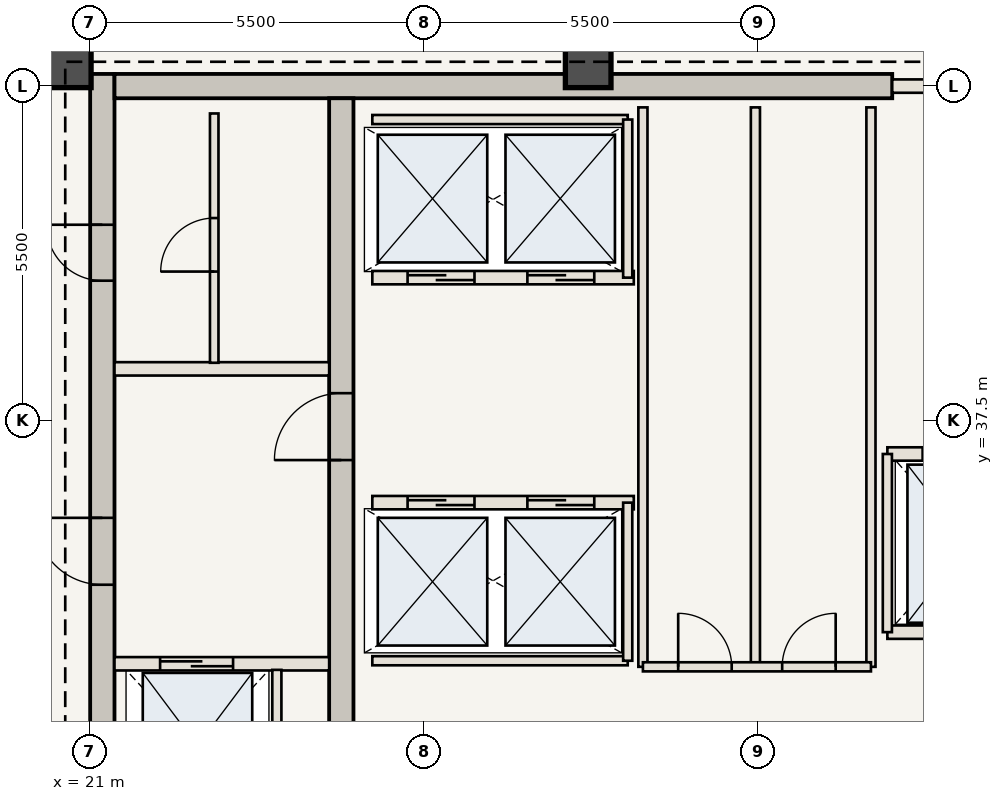
"""IFC4 building model, lengths in metres.
Left out: names, types, materials, properties, quantities, classifications, styles, units other than length and angle.
Written with IfcOpenShell. Run it as: python <this file> out.ifc"""

import sys

from ifc_helpers import new_model, si_unit, direction, frame, frame_2d, origin, origin_2d, place, context, subcontext, project, spatial, rectangle, extrude, element, fill, save


model = new_model("IFC4")
c1 = context("Model", 3, precision=1e-05, world=origin(), true_north=direction((0.0, 1.0)))
c2 = subcontext(c1, "Body", "Model", "MODEL_VIEW")
j1 = project(units=[si_unit("LENGTHUNIT", "METRE"), si_unit("PLANEANGLEUNIT", "RADIAN")], contexts=[c1])
p1 = place(None, origin())
s1 = spatial("IfcSite", under=j1, at=p1, CompositionType="ELEMENT")
p2 = place(p1, origin())
s2 = spatial("IfcBuilding", under=s1, at=p2, CompositionType="ELEMENT")
p3 = place(p2, frame((0.0, 0.0, 281.4)))
s3 = spatial("IfcBuildingStorey", under=s2, at=p3, CompositionType="ELEMENT", Elevation=281.4)
p4 = place(p3, frame((21.21, 30.6, 0.0), z_axis=(0.0, 0.0, 1.0), x_axis=(0.0, 1.0, 0.0)))
e1 = element("IfcWall", 1, at=p4, inside=s3, PredefinedType="SHEAR", context=c2, shape_type="SweptSolid", body=[
    extrude(rectangle(XDim=12.6, YDim=0.4, at=frame_2d((6.3, 0.0))), origin(), (0.0, 0.0, 1.0), 3.85),
])
p5 = place(p4, frame((4.2, 0.0, 0.0)))
e2 = element("IfcOpeningElement", 2, at=p5, cuts=e1, PredefinedType="OPENING", context=c2, shape_type="SweptSolid", body=[
    extrude(rectangle(XDim=1.1, YDim=2.15, at=frame_2d((0.55, 1.075))), frame((0.0, 0.21, 0.0), z_axis=(0.0, -1.0, 0.0), x_axis=(1.0, 0.0, 0.0)), (0.0, 0.0, 1.0), 0.42),
])
p6 = place(p4, frame((9.2, 0.0, 0.0)))
e3 = element("IfcOpeningElement", 3, at=p6, cuts=e1, PredefinedType="OPENING", context=c2, shape_type="SweptSolid", body=[
    extrude(rectangle(XDim=0.92, YDim=2.1, at=frame_2d((0.46, 1.05))), frame((0.0, 0.21, 0.0), z_axis=(0.0, -1.0, 0.0), x_axis=(1.0, 0.0, 0.0)), (0.0, 0.0, 1.0), 0.42),
])
p7 = place(p3, frame((21.41, 43.0, 0.0), z_axis=(0.0, 0.0, 1.0), x_axis=(1.0, 0.0, 0.0)))
e4 = element("IfcWall", 4, at=p7, inside=s3, PredefinedType="SHEAR", context=c2, shape_type="SweptSolid", body=[
    extrude(rectangle(XDim=12.79, YDim=0.4, at=frame_2d((6.395, 0.0))), origin(), (0.0, 0.0, 1.0), 3.85),
])
p8 = place(p3, frame((25.14, 30.6, 0.0), z_axis=(0.0, 0.0, 1.0), x_axis=(0.0, 1.0, 0.0)))
e5 = element("IfcWall", 5, at=p8, inside=s3, PredefinedType="SHEAR", context=c2, shape_type="SweptSolid", body=[
    extrude(rectangle(XDim=12.2, YDim=0.4, at=frame_2d((6.1, 0.0))), origin(), (0.0, 0.0, 1.0), 3.85),
])
p9 = place(p8, frame((6.25, 0.0, 0.0)))
e6 = element("IfcOpeningElement", 6, at=p9, cuts=e5, PredefinedType="OPENING", context=c2, shape_type="SweptSolid", body=[
    extrude(rectangle(XDim=1.1, YDim=2.15, at=frame_2d((0.55, 1.075))), frame((0.0, 0.21, 0.0), z_axis=(0.0, -1.0, 0.0), x_axis=(1.0, 0.0, 0.0)), (0.0, 0.0, 1.0), 0.42),
])
for number, where, z_axis, x_axis in (
    (7, (29.2, 43.35, 0.0), (0.0, 0.0, 1.0), (1.0, 0.0, 0.0)),
    (8, (20.65, 43.35, 0.0), (0.0, 0.0, 1.0), (1.0, 0.0, 0.0)),
):
    element("IfcColumn", number, at=place(p3, frame(where, z_axis=z_axis, x_axis=x_axis)), inside=s3, PredefinedType="COLUMN", context=c2, shape_type="SweptSolid", body=[
        extrude(rectangle(XDim=0.75, YDim=0.75, at=origin_2d()), origin(), (0.0, 0.0, 1.0), 3.85),
    ])
p10 = place(p3, frame((21.41, 33.5, 0.0), z_axis=(0.0, 0.0, 1.0), x_axis=(1.0, 0.0, 0.0)))
e9 = element("IfcWall", 9, at=p10, inside=s3, PredefinedType="STANDARD", context=c2, shape_type="SweptSolid", body=[
    extrude(rectangle(XDim=3.53, YDim=0.22, at=frame_2d((1.765, 0.0))), origin(), (0.0, 0.0, 1.0), 3.685),
])
p11 = place(p10, frame((0.75, 0.0, 0.0)))
e10 = element("IfcOpeningElement", 10, at=p11, cuts=e9, PredefinedType="OPENING", context=c2, shape_type="SweptSolid", body=[
    extrude(rectangle(XDim=1.2, YDim=2.2, at=frame_2d((0.6, 1.1))), frame((0.0, 0.12, 0.0), z_axis=(0.0, -1.0, 0.0), x_axis=(1.0, 0.0, 0.0)), (0.0, 0.0, 1.0), 0.24),
])
p12 = place(p3, frame((24.08, 30.75, 0.0), z_axis=(0.0, 0.0, 1.0), x_axis=(0.0, 1.0, 0.0)))
e11 = element("IfcWall", 11, at=p12, inside=s3, PredefinedType="STANDARD", context=c2, shape_type="SweptSolid", body=[
    extrude(rectangle(XDim=2.65, YDim=0.15, at=frame_2d((1.325, 0.0))), origin(), (0.0, 0.0, 1.0), 3.685),
])
p13 = place(p3, frame((21.41, 38.35, 0.0), z_axis=(0.0, 0.0, 1.0), x_axis=(1.0, 0.0, 0.0)))
e12 = element("IfcWall", 12, at=p13, inside=s3, PredefinedType="STANDARD", context=c2, shape_type="SweptSolid", body=[
    extrude(rectangle(XDim=3.53, YDim=0.22, at=frame_2d((1.765, 0.0))), origin(), (0.0, 0.0, 1.0), 3.685),
])
p14 = place(p3, frame((23.05, 38.45, 0.0), z_axis=(0.0, 0.0, 1.0), x_axis=(0.0, 1.0, 0.0)))
e13 = element("IfcWall", 13, at=p14, inside=s3, PredefinedType="STANDARD", context=c2, shape_type="SweptSolid", body=[
    extrude(rectangle(XDim=4.1, YDim=0.14, at=frame_2d((2.05, 0.0))), origin(), (0.0, 0.0, 1.0), 3.685),
])
p15 = place(p14, frame((1.5, 0.0, 0.0)))
e14 = element("IfcOpeningElement", 14, at=p15, cuts=e13, PredefinedType="OPENING", context=c2, shape_type="SweptSolid", body=[
    extrude(rectangle(XDim=0.88, YDim=2.1, at=frame_2d((0.44, 1.05))), frame((0.0, 0.08, 0.0), z_axis=(0.0, -1.0, 0.0), x_axis=(1.0, 0.0, 0.0)), (0.0, 0.0, 1.0), 0.16),
])
p16 = place(p3, frame((25.65, 36.15, 0.0), z_axis=(0.0, 0.0, 1.0), x_axis=(1.0, 0.0, 0.0)))
e15 = element("IfcWall", 15, at=p16, inside=s3, PredefinedType="STANDARD", context=c2, shape_type="SweptSolid", body=[
    extrude(rectangle(XDim=4.3, YDim=0.22, at=frame_2d((2.15, 0.0))), origin(), (0.0, 0.0, 1.0), 3.685),
])
p17 = place(p16, frame((0.58, 0.0, 0.0)))
e16 = element("IfcOpeningElement", 16, at=p17, cuts=e15, PredefinedType="OPENING", context=c2, shape_type="SweptSolid", body=[
    extrude(rectangle(XDim=1.1, YDim=2.15, at=frame_2d((0.55, 1.075))), frame((0.0, 0.12, 0.0), z_axis=(0.0, -1.0, 0.0), x_axis=(1.0, 0.0, 0.0)), (0.0, 0.0, 1.0), 0.24),
])
p18 = place(p16, frame((2.55, 0.0, 0.0)))
e17 = element("IfcOpeningElement", 17, at=p18, cuts=e15, PredefinedType="OPENING", context=c2, shape_type="SweptSolid", body=[
    extrude(rectangle(XDim=1.1, YDim=2.15, at=frame_2d((0.55, 1.075))), frame((0.0, 0.12, 0.0), z_axis=(0.0, -1.0, 0.0), x_axis=(1.0, 0.0, 0.0)), (0.0, 0.0, 1.0), 0.24),
])
p19 = place(p3, frame((25.65, 33.55, 0.0), z_axis=(0.0, 0.0, 1.0), x_axis=(1.0, 0.0, 0.0)))
e18 = element("IfcWall", 18, at=p19, inside=s3, PredefinedType="STANDARD", context=c2, shape_type="SweptSolid", body=[
    extrude(rectangle(XDim=4.2, YDim=0.15, at=frame_2d((2.1, 0.0))), origin(), (0.0, 0.0, 1.0), 3.685),
])
p20 = place(p3, frame((29.85, 33.55, 0.0), z_axis=(0.0, 0.0, 1.0), x_axis=(0.0, 1.0, 0.0)))
e19 = element("IfcWall", 19, at=p20, inside=s3, PredefinedType="STANDARD", context=c2, shape_type="SweptSolid", body=[
    extrude(rectangle(XDim=2.6, YDim=0.15, at=frame_2d((1.3, 0.0))), origin(), (0.0, 0.0, 1.0), 3.685),
])
p21 = place(p3, frame((25.65, 39.85, 0.0), z_axis=(0.0, 0.0, 1.0), x_axis=(1.0, 0.0, 0.0)))
e20 = element("IfcWall", 20, at=p21, inside=s3, PredefinedType="STANDARD", context=c2, shape_type="SweptSolid", body=[
    extrude(rectangle(XDim=4.3, YDim=0.22, at=frame_2d((2.15, 0.0))), origin(), (0.0, 0.0, 1.0), 3.685),
])
p22 = place(p21, frame((0.58, 0.0, 0.0)))
e21 = element("IfcOpeningElement", 21, at=p22, cuts=e20, PredefinedType="OPENING", context=c2, shape_type="SweptSolid", body=[
    extrude(rectangle(XDim=1.1, YDim=2.15, at=frame_2d((0.55, 1.075))), frame((0.0, 0.12, 0.0), z_axis=(0.0, -1.0, 0.0), x_axis=(1.0, 0.0, 0.0)), (0.0, 0.0, 1.0), 0.24),
])
p23 = place(p21, frame((2.55, 0.0, 0.0)))
e22 = element("IfcOpeningElement", 22, at=p23, cuts=e20, PredefinedType="OPENING", context=c2, shape_type="SweptSolid", body=[
    extrude(rectangle(XDim=1.1, YDim=2.15, at=frame_2d((0.55, 1.075))), frame((0.0, 0.12, 0.0), z_axis=(0.0, -1.0, 0.0), x_axis=(1.0, 0.0, 0.0)), (0.0, 0.0, 1.0), 0.24),
])
p24 = place(p3, frame((25.65, 42.45, 0.0), z_axis=(0.0, 0.0, 1.0), x_axis=(1.0, 0.0, 0.0)))
e23 = element("IfcWall", 23, at=p24, inside=s3, PredefinedType="STANDARD", context=c2, shape_type="SweptSolid", body=[
    extrude(rectangle(XDim=4.2, YDim=0.15, at=frame_2d((2.1, 0.0))), origin(), (0.0, 0.0, 1.0), 3.685),
])
p25 = place(p3, frame((29.85, 39.85, 0.0), z_axis=(0.0, 0.0, 1.0), x_axis=(0.0, 1.0, 0.0)))
e24 = element("IfcWall", 24, at=p25, inside=s3, PredefinedType="STANDARD", context=c2, shape_type="SweptSolid", body=[
    extrude(rectangle(XDim=2.6, YDim=0.15, at=frame_2d((1.3, 0.0))), origin(), (0.0, 0.0, 1.0), 3.685),
])
for number, where, z_axis, x_axis in (
    (25, (30.1, 33.45, 0.0), (0.0, 0.0, 1.0), (0.0, 1.0, 0.0)),
    (26, (31.95, 33.45, 0.0), (0.0, 0.0, 1.0), (0.0, 1.0, 0.0)),
    (27, (33.85, 33.45, 0.0), (0.0, 0.0, 1.0), (0.0, 1.0, 0.0)),
):
    element("IfcWall", number, at=place(p3, frame(where, z_axis=z_axis, x_axis=x_axis)), inside=s3, PredefinedType="STANDARD", context=c2, shape_type="SweptSolid", body=[
        extrude(rectangle(XDim=9.2, YDim=0.15, at=frame_2d((4.6, 0.0))), origin(), (0.0, 0.0, 1.0), 3.685),
    ])
p26 = place(p3, frame((30.1, 33.45, 0.0), z_axis=(0.0, 0.0, 1.0), x_axis=(1.0, 0.0, 0.0)))
e28 = element("IfcWall", 28, at=p26, inside=s3, PredefinedType="STANDARD", context=c2, shape_type="SweptSolid", body=[
    extrude(rectangle(XDim=3.75, YDim=0.15, at=frame_2d((1.875, 0.0))), origin(), (0.0, 0.0, 1.0), 3.685),
])
p27 = place(p26, frame((0.58, 0.0, 0.0)))
e29 = element("IfcOpeningElement", 29, at=p27, cuts=e28, PredefinedType="OPENING", context=c2, shape_type="SweptSolid", body=[
    extrude(rectangle(XDim=0.88, YDim=2.1, at=frame_2d((0.44, 1.05))), frame((0.0, 0.085, 0.0), z_axis=(0.0, -1.0, 0.0), x_axis=(1.0, 0.0, 0.0)), (0.0, 0.0, 1.0), 0.17),
])
p28 = place(p26, frame((2.29, 0.0, 0.0)))
e30 = element("IfcOpeningElement", 30, at=p28, cuts=e28, PredefinedType="OPENING", context=c2, shape_type="SweptSolid", body=[
    extrude(rectangle(XDim=0.88, YDim=2.1, at=frame_2d((0.44, 1.05))), frame((0.0, 0.085, 0.0), z_axis=(0.0, -1.0, 0.0), x_axis=(1.0, 0.0, 0.0)), (0.0, 0.0, 1.0), 0.17),
])
p29 = place(p3, frame((34.2, 43.0, 0.0), z_axis=(0.0, 0.0, 1.0), x_axis=(1.0, 0.0, 0.0)))
e31 = element("IfcWall", 31, at=p29, inside=s3, PredefinedType="STANDARD", context=c2, shape_type="SweptSolid", body=[
    extrude(rectangle(XDim=3.55, YDim=0.22, at=frame_2d((1.775, 0.0))), origin(), (0.0, 0.0, 1.0), 3.685),
])
p30 = place(p29, frame((1.4, 0.0, 0.0)))
e32 = element("IfcOpeningElement", 32, at=p30, cuts=e31, PredefinedType="OPENING", context=c2, shape_type="SweptSolid", body=[
    extrude(rectangle(XDim=1.1, YDim=2.15, at=frame_2d((0.55, 1.075))), frame((0.0, 0.12, 0.0), z_axis=(0.0, -1.0, 0.0), x_axis=(1.0, 0.0, 0.0)), (0.0, 0.0, 1.0), 0.24),
])
p31 = place(p3, frame((34.12, 36.95, 0.0), z_axis=(0.0, 0.0, 1.0), x_axis=(1.0, 0.0, 0.0)))
e33 = element("IfcWall", 33, at=p31, inside=s3, PredefinedType="STANDARD", context=c2, shape_type="SweptSolid", body=[
    extrude(rectangle(XDim=2.68, YDim=0.22, at=frame_2d((1.34, 0.0))), origin(), (0.0, 0.0, 1.0), 3.685),
])
p32 = place(p31, frame((0.58, 0.0, 0.0)))
e34 = element("IfcOpeningElement", 34, at=p32, cuts=e33, PredefinedType="OPENING", context=c2, shape_type="SweptSolid", body=[
    extrude(rectangle(XDim=1.2, YDim=2.2, at=frame_2d((0.6, 1.1))), frame((0.0, 0.12, 0.0), z_axis=(0.0, -1.0, 0.0), x_axis=(1.0, 0.0, 0.0)), (0.0, 0.0, 1.0), 0.24),
])
p33 = place(p3, frame((34.12, 34.02, 0.0), z_axis=(0.0, 0.0, 1.0), x_axis=(1.0, 0.0, 0.0)))
e35 = element("IfcWall", 35, at=p33, inside=s3, PredefinedType="STANDARD", context=c2, shape_type="SweptSolid", body=[
    extrude(rectangle(XDim=2.68, YDim=0.22, at=frame_2d((1.34, 0.0))), origin(), (0.0, 0.0, 1.0), 3.685),
])
p34 = place(p3, frame((34.12, 34.02, 0.0), z_axis=(0.0, 0.0, 1.0), x_axis=(0.0, 1.0, 0.0)))
e36 = element("IfcWall", 36, at=p34, inside=s3, PredefinedType="STANDARD", context=c2, shape_type="SweptSolid", body=[
    extrude(rectangle(XDim=2.93, YDim=0.15, at=frame_2d((1.465, 0.0))), origin(), (0.0, 0.0, 1.0), 3.685),
])
p35 = place(p5, origin())
e37 = element("IfcDoor", 37, at=p35, inside=s3, OperationType="SINGLE_SWING_RIGHT", PredefinedType="DOOR", context=c2, shape_type="SweptSolid", body=[
    extrude(rectangle(XDim=1.1, YDim=2.15, at=frame_2d((0.55, 1.075))), frame((0.0, 0.025, 0.0), z_axis=(0.0, -1.0, 0.0), x_axis=(1.0, 0.0, 0.0)), (0.0, 0.0, 1.0), 0.05),
])
fill(e2, e37)
p36 = place(p9, origin())
e38 = element("IfcDoor", 38, at=p36, inside=s3, OperationType="SINGLE_SWING_LEFT", PredefinedType="DOOR", context=c2, shape_type="SweptSolid", body=[
    extrude(rectangle(XDim=1.1, YDim=2.15, at=frame_2d((0.55, 1.075))), frame((0.0, 0.025, 0.0), z_axis=(0.0, -1.0, 0.0), x_axis=(1.0, 0.0, 0.0)), (0.0, 0.0, 1.0), 0.05),
])
fill(e6, e38)
p37 = place(p6, origin())
e39 = element("IfcDoor", 39, at=p37, inside=s3, OperationType="SINGLE_SWING_RIGHT", PredefinedType="DOOR", context=c2, shape_type="SweptSolid", body=[
    extrude(rectangle(XDim=0.92, YDim=2.1, at=frame_2d((0.46, 1.05))), frame((0.0, 0.025, 0.0), z_axis=(0.0, -1.0, 0.0), x_axis=(1.0, 0.0, 0.0)), (0.0, 0.0, 1.0), 0.05),
])
fill(e3, e39)
p38 = place(p11, origin())
e40 = element("IfcDoor", 40, at=p38, inside=s3, OperationType="DOUBLE_DOOR_SLIDING", PredefinedType="DOOR", context=c2, shape_type="SweptSolid", body=[
    extrude(rectangle(XDim=1.2, YDim=2.2, at=frame_2d((0.6, 1.1))), frame((0.0, 0.025, 0.0), z_axis=(0.0, -1.0, 0.0), x_axis=(1.0, 0.0, 0.0)), (0.0, 0.0, 1.0), 0.05),
])
fill(e10, e40)
p39 = place(p15, origin())
e41 = element("IfcDoor", 41, at=p39, inside=s3, OperationType="SINGLE_SWING_LEFT", PredefinedType="DOOR", context=c2, shape_type="SweptSolid", body=[
    extrude(rectangle(XDim=0.88, YDim=2.1, at=frame_2d((0.44, 1.05))), frame((0.0, 0.025, 0.0), z_axis=(0.0, -1.0, 0.0), x_axis=(1.0, 0.0, 0.0)), (0.0, 0.0, 1.0), 0.05),
])
fill(e14, e41)
p40 = place(p17, origin())
e42 = element("IfcDoor", 42, at=p40, inside=s3, OperationType="DOUBLE_DOOR_SLIDING", PredefinedType="DOOR", context=c2, shape_type="SweptSolid", body=[
    extrude(rectangle(XDim=1.1, YDim=2.15, at=frame_2d((0.55, 1.075))), frame((0.0, 0.025, 0.0), z_axis=(0.0, -1.0, 0.0), x_axis=(1.0, 0.0, 0.0)), (0.0, 0.0, 1.0), 0.05),
])
fill(e16, e42)
p41 = place(p18, origin())
e43 = element("IfcDoor", 43, at=p41, inside=s3, OperationType="DOUBLE_DOOR_SLIDING", PredefinedType="DOOR", context=c2, shape_type="SweptSolid", body=[
    extrude(rectangle(XDim=1.1, YDim=2.15, at=frame_2d((0.55, 1.075))), frame((0.0, 0.025, 0.0), z_axis=(0.0, -1.0, 0.0), x_axis=(1.0, 0.0, 0.0)), (0.0, 0.0, 1.0), 0.05),
])
fill(e17, e43)
p42 = place(p22, origin())
e44 = element("IfcDoor", 44, at=p42, inside=s3, OperationType="DOUBLE_DOOR_SLIDING", PredefinedType="DOOR", context=c2, shape_type="SweptSolid", body=[
    extrude(rectangle(XDim=1.1, YDim=2.15, at=frame_2d((0.55, 1.075))), frame((0.0, 0.025, 0.0), z_axis=(0.0, -1.0, 0.0), x_axis=(1.0, 0.0, 0.0)), (0.0, 0.0, 1.0), 0.05),
])
fill(e21, e44)
p43 = place(p23, origin())
e45 = element("IfcDoor", 45, at=p43, inside=s3, OperationType="DOUBLE_DOOR_SLIDING", PredefinedType="DOOR", context=c2, shape_type="SweptSolid", body=[
    extrude(rectangle(XDim=1.1, YDim=2.15, at=frame_2d((0.55, 1.075))), frame((0.0, 0.025, 0.0), z_axis=(0.0, -1.0, 0.0), x_axis=(1.0, 0.0, 0.0)), (0.0, 0.0, 1.0), 0.05),
])
fill(e22, e45)
p44 = place(p27, origin())
e46 = element("IfcDoor", 46, at=p44, inside=s3, OperationType="SINGLE_SWING_LEFT", PredefinedType="DOOR", context=c2, shape_type="SweptSolid", body=[
    extrude(rectangle(XDim=0.88, YDim=2.1, at=frame_2d((0.44, 1.05))), frame((0.0, 0.025, 0.0), z_axis=(0.0, -1.0, 0.0), x_axis=(1.0, 0.0, 0.0)), (0.0, 0.0, 1.0), 0.05),
])
fill(e29, e46)
p45 = place(p28, origin())
e47 = element("IfcDoor", 47, at=p45, inside=s3, OperationType="SINGLE_SWING_RIGHT", PredefinedType="DOOR", context=c2, shape_type="SweptSolid", body=[
    extrude(rectangle(XDim=0.88, YDim=2.1, at=frame_2d((0.44, 1.05))), frame((0.0, 0.025, 0.0), z_axis=(0.0, -1.0, 0.0), x_axis=(1.0, 0.0, 0.0)), (0.0, 0.0, 1.0), 0.05),
])
fill(e30, e47)
p46 = place(p32, origin())
e48 = element("IfcDoor", 48, at=p46, inside=s3, OperationType="DOUBLE_DOOR_SLIDING", PredefinedType="DOOR", context=c2, shape_type="SweptSolid", body=[
    extrude(rectangle(XDim=1.2, YDim=2.2, at=frame_2d((0.6, 1.1))), frame((0.0, 0.025, 0.0), z_axis=(0.0, -1.0, 0.0), x_axis=(1.0, 0.0, 0.0)), (0.0, 0.0, 1.0), 0.05),
])
fill(e34, e48)
save(model, sys.argv[1])
